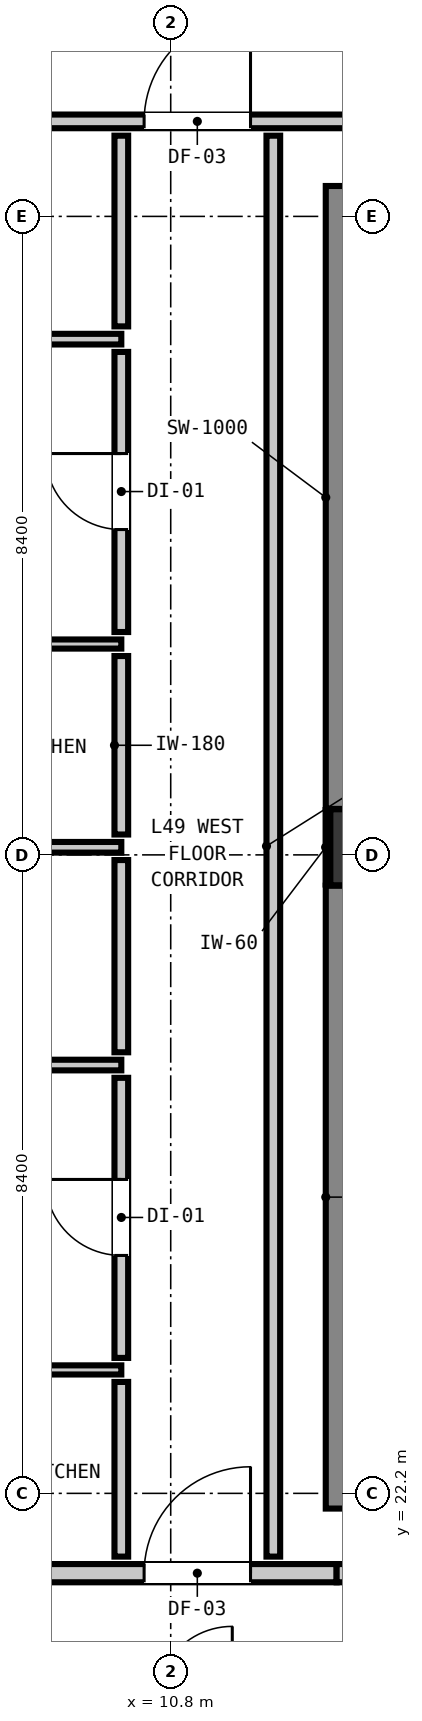
"""IFC4 building model, lengths in metres.
Left out: names, types, materials, properties, quantities, classifications, styles, units other than length and angle.
Written with IfcOpenShell. Run it as: python <this file> out.ifc"""

import sys

from ifc_helpers import new_model, si_unit, direction, frame, frame_2d, origin, origin_2d, place, context, subcontext, project, spatial, rectangle, extrude, element, fill, save


model = new_model("IFC4")
c1 = context("Model", 3, precision=1e-05, world=origin(), true_north=direction((0.0, 1.0)))
c2 = subcontext(c1, "Body", "Model", "MODEL_VIEW")
j1 = project(units=[si_unit("LENGTHUNIT", "METRE"), si_unit("PLANEANGLEUNIT", "RADIAN")], contexts=[c1])
p1 = place(None, origin())
s1 = spatial("IfcSite", under=j1, at=p1, CompositionType="ELEMENT")
p2 = place(p1, origin())
s2 = spatial("IfcBuilding", under=s1, at=p2, CompositionType="ELEMENT")
p3 = place(p2, frame((0.0, 0.0, 169.16)))
s3 = spatial("IfcBuildingStorey", under=s2, at=p3, CompositionType="ELEMENT", Elevation=169.16)
p4 = place(p3, frame((13.4, 30.7, 0.0), z_axis=(0.0, 0.0, 1.0), x_axis=(1.0, 0.0, 0.0)))
e1 = element("IfcColumn", 1, at=p4, inside=s3, PredefinedType="COLUMN", context=c2, shape_type="SweptSolid", body=[
    extrude(rectangle(XDim=1.0, YDim=1.0, at=origin_2d()), origin(), (0.0, 0.0, 1.0), 3.32),
])
p5 = place(p3, frame((13.34, 22.0, 0.0), z_axis=(0.0, 0.0, 1.0), x_axis=(0.0, 1.0, 0.0)))
e2 = element("IfcWall", 2, at=p5, inside=s3, PredefinedType="SHEAR", context=c2, shape_type="SweptSolid", body=[
    extrude(rectangle(XDim=8.195, YDim=1.0, at=frame_2d((4.098, 0.0))), origin(), (0.0, 0.0, 1.0), 3.32),
])
p6 = place(p3, frame((13.34, 31.205, 0.0), z_axis=(0.0, 0.0, 1.0), x_axis=(0.0, 1.0, 0.0)))
e3 = element("IfcWall", 3, at=p6, inside=s3, PredefinedType="SHEAR", context=c2, shape_type="SweptSolid", body=[
    extrude(rectangle(XDim=8.195, YDim=1.0, at=frame_2d((4.097, 0.0))), origin(), (0.0, 0.0, 1.0), 3.32),
])
p7 = place(p3, frame((4.067, 21.15, 0.0), z_axis=(0.0, 0.0, 1.0), x_axis=(1.0, 0.0, 0.0)))
e4 = element("IfcWall", 4, at=p7, inside=s3, PredefinedType="PARTITIONING", context=c2, shape_type="SweptSolid", body=[
    extrude(rectangle(XDim=8.916, YDim=0.24, at=frame_2d((4.458, 0.0))), origin(), (0.0, 0.0, 1.0), 2.445),
])
p8 = place(p7, frame((6.383, 0.0, 0.0)))
e5 = element("IfcOpeningElement", 5, at=p8, cuts=e4, PredefinedType="OPENING", context=c2, shape_type="SweptSolid", body=[
    extrude(rectangle(XDim=1.4, YDim=2.15, at=frame_2d((0.7, 1.075))), frame((0.0, 0.13, 0.0), z_axis=(0.0, -1.0, 0.0), x_axis=(1.0, 0.0, 0.0)), (0.0, 0.0, 1.0), 0.26),
])
p9 = place(p3, frame((12.983, 21.15, 0.0), z_axis=(0.0, 0.0, 1.0), x_axis=(1.0, 0.0, 0.0)))
e6 = element("IfcWall", 6, at=p9, inside=s3, PredefinedType="PARTITIONING", context=c2, shape_type="SweptSolid", body=[
    extrude(rectangle(XDim=29.61, YDim=0.24, at=frame_2d((14.805, 0.0))), origin(), (0.0, 0.0, 1.0), 2.96),
])
p10 = place(p9, frame((5.227, 0.0, 0.0)))
e7 = element("IfcOpeningElement", 7, at=p10, cuts=e6, PredefinedType="OPENING", context=c2, shape_type="SweptSolid", body=[
    extrude(rectangle(XDim=1.1, YDim=2.15, at=frame_2d((0.55, 1.075))), frame((0.0, 0.13, 0.0), z_axis=(0.0, -1.0, 0.0), x_axis=(1.0, 0.0, 0.0)), (0.0, 0.0, 1.0), 0.26),
])
p11 = place(p9, frame((25.067, 0.0, 0.0)))
e8 = element("IfcOpeningElement", 8, at=p11, cuts=e6, PredefinedType="OPENING", context=c2, shape_type="SweptSolid", body=[
    extrude(rectangle(XDim=1.4, YDim=2.15, at=frame_2d((0.7, 1.075))), frame((0.0, 0.13, 0.0), z_axis=(0.0, -1.0, 0.0), x_axis=(1.0, 0.0, 0.0)), (0.0, 0.0, 1.0), 0.26),
])
p12 = place(p3, frame((3.207, 40.25, 0.0), z_axis=(0.0, 0.0, 1.0), x_axis=(1.0, 0.0, 0.0)))
e9 = element("IfcWall", 9, at=p12, inside=s3, PredefinedType="PARTITIONING", context=c2, shape_type="SweptSolid", body=[
    extrude(rectangle(XDim=39.386, YDim=0.18, at=frame_2d((19.693, 0.0))), origin(), (0.0, 0.0, 1.0), 2.96),
])
p13 = place(p12, frame((14.228, 0.0, 0.0)))
e10 = element("IfcOpeningElement", 10, at=p13, cuts=e9, PredefinedType="OPENING", context=c2, shape_type="SweptSolid", body=[
    extrude(rectangle(XDim=1.4, YDim=2.15, at=frame_2d((0.7, 1.075))), frame((0.0, 0.1, 0.0), z_axis=(0.0, -1.0, 0.0), x_axis=(1.0, 0.0, 0.0)), (0.0, 0.0, 1.0), 0.2),
])
p14 = place(p12, frame((7.243, 0.0, 0.0)))
e11 = element("IfcOpeningElement", 11, at=p14, cuts=e9, PredefinedType="OPENING", context=c2, shape_type="SweptSolid", body=[
    extrude(rectangle(XDim=1.4, YDim=2.15, at=frame_2d((0.7, 1.075))), frame((0.0, 0.1, 0.0), z_axis=(0.0, -1.0, 0.0), x_axis=(1.0, 0.0, 0.0)), (0.0, 0.0, 1.0), 0.2),
])
p15 = place(p12, frame((34.843, 0.0, 0.0)))
e12 = element("IfcOpeningElement", 12, at=p15, cuts=e9, PredefinedType="OPENING", context=c2, shape_type="SweptSolid", body=[
    extrude(rectangle(XDim=1.4, YDim=2.15, at=frame_2d((0.7, 1.075))), frame((0.0, 0.1, 0.0), z_axis=(0.0, -1.0, 0.0), x_axis=(1.0, 0.0, 0.0)), (0.0, 0.0, 1.0), 0.2),
])
p16 = place(p3, frame((3.207, 27.835, 0.0), z_axis=(0.0, 0.0, 1.0), x_axis=(1.0, 0.0, 0.0)))
e13 = element("IfcWall", 13, at=p16, inside=s3, PredefinedType="PARTITIONING", context=c2, shape_type="SweptSolid", body=[
    extrude(rectangle(XDim=6.943, YDim=0.14, at=frame_2d((3.471, 0.0))), origin(), (0.0, 0.0, 1.0), 2.96),
])
p17 = place(p16, frame((5.006, 0.0, 0.0)))
e14 = element("IfcOpeningElement", 14, at=p17, cuts=e13, PredefinedType="OPENING", context=c2, shape_type="SweptSolid", body=[
    extrude(rectangle(XDim=0.86, YDim=2.02, at=frame_2d((0.43, 1.01))), frame((0.0, 0.08, 0.0), z_axis=(0.0, -1.0, 0.0), x_axis=(1.0, 0.0, 0.0)), (0.0, 0.0, 1.0), 0.16),
])
p18 = place(p16, frame((1.537, 0.0, 0.0)))
e15 = element("IfcOpeningElement", 15, at=p18, cuts=e13, PredefinedType="OPENING", context=c2, shape_type="SweptSolid", body=[
    extrude(rectangle(XDim=0.9, YDim=2.1, at=frame_2d((0.45, 1.05))), frame((0.0, 0.08, 0.0), z_axis=(0.0, -1.0, 0.0), x_axis=(1.0, 0.0, 0.0)), (0.0, 0.0, 1.0), 0.16),
])
p19 = place(p3, frame((4.232, 30.7, 0.0), z_axis=(0.0, 0.0, 1.0), x_axis=(1.0, 0.0, 0.0)))
e16 = element("IfcWall", 16, at=p19, inside=s3, PredefinedType="PARTITIONING", context=c2, shape_type="SweptSolid", body=[
    extrude(rectangle(XDim=5.918, YDim=0.14, at=frame_2d((2.959, 0.0))), origin(), (0.0, 0.0, 1.0), 2.195),
])
p20 = place(p3, frame((3.207, 37.385, 0.0), z_axis=(0.0, 0.0, 1.0), x_axis=(1.0, 0.0, 0.0)))
e17 = element("IfcWall", 17, at=p20, inside=s3, PredefinedType="PARTITIONING", context=c2, shape_type="SweptSolid", body=[
    extrude(rectangle(XDim=6.943, YDim=0.14, at=frame_2d((3.471, 0.0))), origin(), (0.0, 0.0, 1.0), 2.96),
])
p21 = place(p20, frame((5.006, 0.0, 0.0)))
e18 = element("IfcOpeningElement", 18, at=p21, cuts=e17, PredefinedType="OPENING", context=c2, shape_type="SweptSolid", body=[
    extrude(rectangle(XDim=0.86, YDim=2.02, at=frame_2d((0.43, 1.01))), frame((0.0, 0.08, 0.0), z_axis=(0.0, -1.0, 0.0), x_axis=(1.0, 0.0, 0.0)), (0.0, 0.0, 1.0), 0.16),
])
p22 = place(p20, frame((1.537, 0.0, 0.0)))
e19 = element("IfcOpeningElement", 19, at=p22, cuts=e17, PredefinedType="OPENING", context=c2, shape_type="SweptSolid", body=[
    extrude(rectangle(XDim=0.9, YDim=2.1, at=frame_2d((0.45, 1.05))), frame((0.0, 0.08, 0.0), z_axis=(0.0, -1.0, 0.0), x_axis=(1.0, 0.0, 0.0)), (0.0, 0.0, 1.0), 0.16),
])
p23 = place(p3, frame((3.207, 23.824, 0.0), z_axis=(0.0, 0.0, 1.0), x_axis=(1.0, 0.0, 0.0)))
e20 = element("IfcWall", 20, at=p23, inside=s3, PredefinedType="PARTITIONING", context=c2, shape_type="SweptSolid", body=[
    extrude(rectangle(XDim=6.943, YDim=0.12, at=frame_2d((3.471, 0.0))), origin(), (0.0, 0.0, 1.0), 2.96),
])
p24 = place(p23, frame((3.018, 0.0, 0.0)))
e21 = element("IfcOpeningElement", 21, at=p24, cuts=e20, PredefinedType="OPENING", context=c2, shape_type="SweptSolid", body=[
    extrude(rectangle(XDim=0.9, YDim=2.1, at=frame_2d((0.45, 1.05))), frame((0.0, 0.07, 0.0), z_axis=(0.0, -1.0, 0.0), x_axis=(1.0, 0.0, 0.0)), (0.0, 0.0, 1.0), 0.14),
])
p25 = place(p3, frame((3.207, 33.374, 0.0), z_axis=(0.0, 0.0, 1.0), x_axis=(1.0, 0.0, 0.0)))
e22 = element("IfcWall", 22, at=p25, inside=s3, PredefinedType="PARTITIONING", context=c2, shape_type="SweptSolid", body=[
    extrude(rectangle(XDim=6.943, YDim=0.12, at=frame_2d((3.471, 0.0))), origin(), (0.0, 0.0, 1.0), 2.96),
])
p26 = place(p25, frame((3.018, 0.0, 0.0)))
e23 = element("IfcOpeningElement", 23, at=p26, cuts=e22, PredefinedType="OPENING", context=c2, shape_type="SweptSolid", body=[
    extrude(rectangle(XDim=0.9, YDim=2.1, at=frame_2d((0.45, 1.05))), frame((0.0, 0.07, 0.0), z_axis=(0.0, -1.0, 0.0), x_axis=(1.0, 0.0, 0.0)), (0.0, 0.0, 1.0), 0.14),
])
p27 = place(p3, frame((10.15, 21.368, 0.0), z_axis=(0.0, 0.0, 1.0), x_axis=(0.0, 1.0, 0.0)))
e24 = element("IfcWall", 24, at=p27, inside=s3, PredefinedType="PARTITIONING", context=c2, shape_type="SweptSolid", body=[
    extrude(rectangle(XDim=2.298, YDim=0.18, at=frame_2d((1.149, 0.0))), origin(), (0.0, 0.0, 1.0), 2.96),
])
p28 = place(p3, frame((10.15, 23.982, 0.0), z_axis=(0.0, 0.0, 1.0), x_axis=(0.0, 1.0, 0.0)))
e25 = element("IfcWall", 25, at=p28, inside=s3, PredefinedType="PARTITIONING", context=c2, shape_type="SweptSolid", body=[
    extrude(rectangle(XDim=3.685, YDim=0.18, at=frame_2d((1.843, 0.0))), origin(), (0.0, 0.0, 1.0), 2.96),
])
p29 = place(p28, frame((1.348, 0.0, 0.0)))
e26 = element("IfcOpeningElement", 26, at=p29, cuts=e25, PredefinedType="OPENING", context=c2, shape_type="SweptSolid", body=[
    extrude(rectangle(XDim=1.0, YDim=2.15, at=frame_2d((0.5, 1.075))), frame((0.0, 0.1, 0.0), z_axis=(0.0, -1.0, 0.0), x_axis=(1.0, 0.0, 0.0)), (0.0, 0.0, 1.0), 0.2),
])
p30 = place(p3, frame((10.15, 28.003, 0.0), z_axis=(0.0, 0.0, 1.0), x_axis=(0.0, 1.0, 0.0)))
e27 = element("IfcWall", 27, at=p30, inside=s3, PredefinedType="PARTITIONING", context=c2, shape_type="SweptSolid", body=[
    extrude(rectangle(XDim=2.529, YDim=0.18, at=frame_2d((1.265, 0.0))), origin(), (0.0, 0.0, 1.0), 2.96),
])
p31 = place(p3, frame((10.15, 30.868, 0.0), z_axis=(0.0, 0.0, 1.0), x_axis=(0.0, 1.0, 0.0)))
e28 = element("IfcWall", 28, at=p31, inside=s3, PredefinedType="PARTITIONING", context=c2, shape_type="SweptSolid", body=[
    extrude(rectangle(XDim=2.348, YDim=0.18, at=frame_2d((1.174, 0.0))), origin(), (0.0, 0.0, 1.0), 2.96),
])
p32 = place(p3, frame((10.15, 33.532, 0.0), z_axis=(0.0, 0.0, 1.0), x_axis=(0.0, 1.0, 0.0)))
e29 = element("IfcWall", 29, at=p32, inside=s3, PredefinedType="PARTITIONING", context=c2, shape_type="SweptSolid", body=[
    extrude(rectangle(XDim=3.685, YDim=0.18, at=frame_2d((1.843, 0.0))), origin(), (0.0, 0.0, 1.0), 2.96),
])
p33 = place(p32, frame((1.348, 0.0, 0.0)))
e30 = element("IfcOpeningElement", 30, at=p33, cuts=e29, PredefinedType="OPENING", context=c2, shape_type="SweptSolid", body=[
    extrude(rectangle(XDim=1.0, YDim=2.15, at=frame_2d((0.5, 1.075))), frame((0.0, 0.1, 0.0), z_axis=(0.0, -1.0, 0.0), x_axis=(1.0, 0.0, 0.0)), (0.0, 0.0, 1.0), 0.2),
])
p34 = place(p3, frame((10.15, 37.553, 0.0), z_axis=(0.0, 0.0, 1.0), x_axis=(0.0, 1.0, 0.0)))
e31 = element("IfcWall", 31, at=p34, inside=s3, PredefinedType="PARTITIONING", context=c2, shape_type="SweptSolid", body=[
    extrude(rectangle(XDim=2.509, YDim=0.18, at=frame_2d((1.254, 0.0))), origin(), (0.0, 0.0, 1.0), 2.96),
])
p35 = place(p3, frame((12.15, 21.368, 0.0), z_axis=(0.0, 0.0, 1.0), x_axis=(0.0, 1.0, 0.0)))
e32 = element("IfcWall", 32, at=p35, inside=s3, PredefinedType="PARTITIONING", context=c2, shape_type="SweptSolid", body=[
    extrude(rectangle(XDim=18.694, YDim=0.18, at=frame_2d((9.347, 0.0))), origin(), (0.0, 0.0, 1.0), 2.96),
])
p36 = place(p3, frame((12.868, 30.21, 0.0), z_axis=(0.0, 0.0, 1.0), x_axis=(0.0, 1.0, 0.0)))
e33 = element("IfcWall", 33, at=p36, inside=s3, PredefinedType="PARTITIONING", context=c2, shape_type="SweptSolid", body=[
    extrude(rectangle(XDim=0.98, YDim=0.06, at=frame_2d((0.49, 0.0))), origin(), (0.0, 0.0, 1.0), 1.45),
])
p37 = place(p8, origin())
e34 = element("IfcDoor", 34, at=p37, inside=s3, OperationType="SINGLE_SWING_RIGHT", PredefinedType="DOOR", context=c2, shape_type="SweptSolid", body=[
    extrude(rectangle(XDim=1.4, YDim=2.15, at=frame_2d((0.7, 1.075))), frame((0.0, 0.025, 0.0), z_axis=(0.0, -1.0, 0.0), x_axis=(1.0, 0.0, 0.0)), (0.0, 0.0, 1.0), 0.05),
])
fill(e5, e34)
p38 = place(p14, origin())
e35 = element("IfcDoor", 35, at=p38, inside=s3, OperationType="SINGLE_SWING_RIGHT", PredefinedType="DOOR", context=c2, shape_type="SweptSolid", body=[
    extrude(rectangle(XDim=1.4, YDim=2.15, at=frame_2d((0.7, 1.075))), frame((0.0, 0.025, 0.0), z_axis=(0.0, -1.0, 0.0), x_axis=(1.0, 0.0, 0.0)), (0.0, 0.0, 1.0), 0.05),
])
fill(e11, e35)
p39 = place(p29, origin())
e36 = element("IfcDoor", 36, at=p39, inside=s3, OperationType="SINGLE_SWING_RIGHT", PredefinedType="DOOR", context=c2, shape_type="SweptSolid", body=[
    extrude(rectangle(XDim=1.0, YDim=2.15, at=frame_2d((0.5, 1.075))), frame((0.0, 0.025, 0.0), z_axis=(0.0, -1.0, 0.0), x_axis=(1.0, 0.0, 0.0)), (0.0, 0.0, 1.0), 0.05),
])
fill(e26, e36)
p40 = place(p33, origin())
e37 = element("IfcDoor", 37, at=p40, inside=s3, OperationType="SINGLE_SWING_RIGHT", PredefinedType="DOOR", context=c2, shape_type="SweptSolid", body=[
    extrude(rectangle(XDim=1.0, YDim=2.15, at=frame_2d((0.5, 1.075))), frame((0.0, 0.025, 0.0), z_axis=(0.0, -1.0, 0.0), x_axis=(1.0, 0.0, 0.0)), (0.0, 0.0, 1.0), 0.05),
])
fill(e30, e37)
save(model, sys.argv[1])
